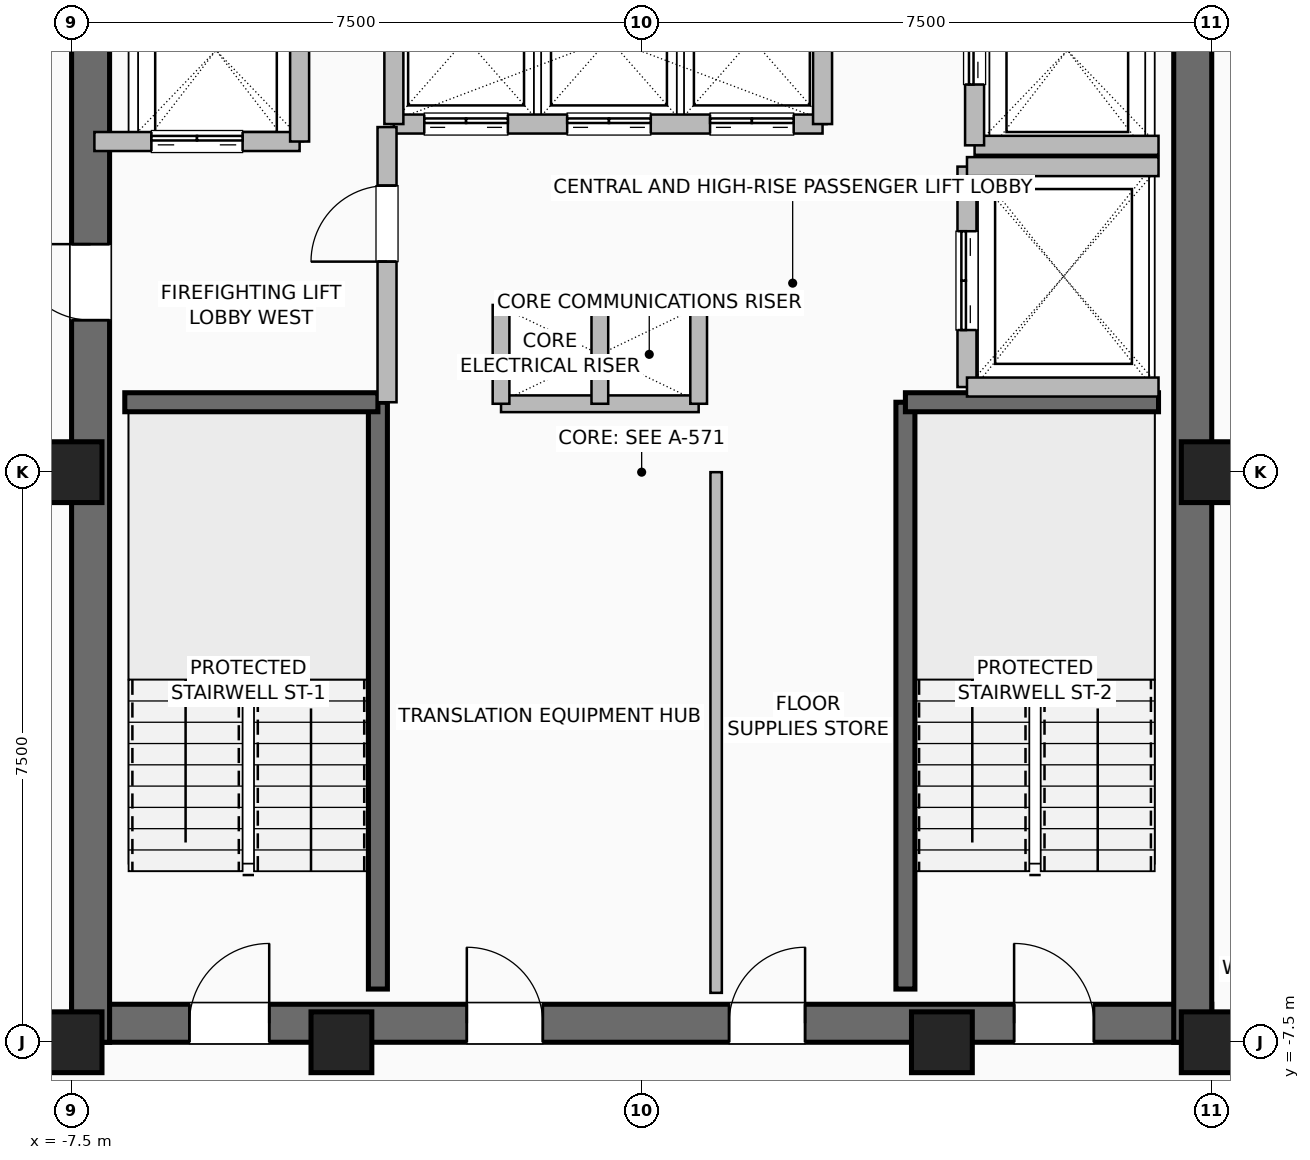
"""IFC4 building model, lengths in metres.
Left out: names, types, materials, properties, quantities, classifications, styles, units other than length and angle.
Written with IfcOpenShell. Run it as: python <this file> out.ifc"""

import sys

from ifc_helpers import new_model, si_unit, direction, frame, frame_2d, origin, origin_2d, place, context, subcontext, project, spatial, rectangle, hollow_rectangle, extrude, element, fill, save


model = new_model("IFC4")
c1 = context("Model", 3, precision=1e-05, world=origin(), true_north=direction((0.0, 1.0)))
c2 = subcontext(c1, "Body", "Model", "MODEL_VIEW")
j1 = project(units=[si_unit("LENGTHUNIT", "METRE"), si_unit("PLANEANGLEUNIT", "RADIAN")], contexts=[c1])
p1 = place(None, origin())
s1 = spatial("IfcSite", under=j1, at=p1, CompositionType="ELEMENT")
p2 = place(p1, origin())
s2 = spatial("IfcBuilding", under=s1, at=p2, CompositionType="ELEMENT")
p3 = place(p2, frame((0.0, 0.0, 282.8)))
s3 = spatial("IfcBuildingStorey", under=s2, at=p3, CompositionType="ELEMENT", Elevation=282.8)
for number, where, z_axis, x_axis in (
    (1, (-7.5, -7.5, 0.0), (0.0, 0.0, 1.0), (1.0, 0.0, 0.0)),
    (2, (-3.95, -7.5, 0.0), (0.0, 0.0, 1.0), (1.0, 0.0, 0.0)),
    (3, (3.95, -7.5, 0.0), (0.0, 0.0, 1.0), (1.0, 0.0, 0.0)),
    (4, (7.5, -7.5, 0.0), (0.0, 0.0, 1.0), (1.0, 0.0, 0.0)),
    (5, (7.5, 0.0, 0.0), (0.0, 0.0, 1.0), (1.0, 0.0, 0.0)),
    (6, (-7.5, 0.0, 0.0), (0.0, 0.0, 1.0), (1.0, 0.0, 0.0)),
):
    element("IfcColumn", number, at=place(p3, frame(where, z_axis=z_axis, x_axis=x_axis)), inside=s3, PredefinedType="COLUMN", context=c2, shape_type="SweptSolid", body=[
        extrude(hollow_rectangle(XDim=0.8, YDim=0.8, WallThickness=0.04, at=origin_2d()), origin(), (0.0, 0.0, 1.0), 3.6),
    ])
p4 = place(p3, frame((-7.5, -7.25, 0.0), z_axis=(0.0, 0.0, 1.0), x_axis=(1.0, 0.0, 0.0)))
e7 = element("IfcWall", 7, at=p4, inside=s3, PredefinedType="SHEAR", context=c2, shape_type="SweptSolid", body=[
    extrude(rectangle(XDim=15.0, YDim=0.5, at=frame_2d((7.5, 0.0))), origin(), (0.0, 0.0, 1.0), 3.36),
])
p5 = place(p4, frame((1.55, 0.0, 0.0)))
e8 = element("IfcOpeningElement", 8, at=p5, cuts=e7, PredefinedType="OPENING", context=c2, shape_type="SweptSolid", body=[
    extrude(rectangle(XDim=1.05, YDim=2.08, at=frame_2d((0.525, 1.04))), frame((0.0, 0.26, 0.0), z_axis=(0.0, -1.0, 0.0), x_axis=(1.0, 0.0, 0.0)), (0.0, 0.0, 1.0), 0.52),
])
p6 = place(p4, frame((12.4, 0.0, 0.0)))
e9 = element("IfcOpeningElement", 9, at=p6, cuts=e7, PredefinedType="OPENING", context=c2, shape_type="SweptSolid", body=[
    extrude(rectangle(XDim=1.05, YDim=2.08, at=frame_2d((0.525, 1.04))), frame((0.0, 0.26, 0.0), z_axis=(0.0, -1.0, 0.0), x_axis=(1.0, 0.0, 0.0)), (0.0, 0.0, 1.0), 0.52),
])
p7 = place(p4, frame((5.2, 0.0, 0.0)))
e10 = element("IfcOpeningElement", 10, at=p7, cuts=e7, PredefinedType="OPENING", context=c2, shape_type="SweptSolid", body=[
    extrude(rectangle(XDim=1.0, YDim=2.08, at=frame_2d((0.5, 1.04))), frame((0.0, 0.26, 0.0), z_axis=(0.0, -1.0, 0.0), x_axis=(1.0, 0.0, 0.0)), (0.0, 0.0, 1.0), 0.52),
])
p8 = place(p4, frame((8.65, 0.0, 0.0)))
e11 = element("IfcOpeningElement", 11, at=p8, cuts=e7, PredefinedType="OPENING", context=c2, shape_type="SweptSolid", body=[
    extrude(rectangle(XDim=1.0, YDim=2.08, at=frame_2d((0.5, 1.04))), frame((0.0, 0.26, 0.0), z_axis=(0.0, -1.0, 0.0), x_axis=(1.0, 0.0, 0.0)), (0.0, 0.0, 1.0), 0.52),
])
p9 = place(p3, frame((-7.25, -7.5, 0.0), z_axis=(0.0, 0.0, 1.0), x_axis=(0.0, 1.0, 0.0)))
e12 = element("IfcWall", 12, at=p9, inside=s3, PredefinedType="SHEAR", context=c2, shape_type="SweptSolid", body=[
    extrude(rectangle(XDim=15.0, YDim=0.5, at=frame_2d((7.5, 0.0))), origin(), (0.0, 0.0, 1.0), 3.36),
])
p10 = place(p9, frame((9.5, 0.0, 0.0)))
e13 = element("IfcOpeningElement", 13, at=p10, cuts=e12, PredefinedType="OPENING", context=c2, shape_type="SweptSolid", body=[
    extrude(rectangle(XDim=1.0, YDim=2.08, at=frame_2d((0.5, 1.04))), frame((0.0, 0.26, 0.0), z_axis=(0.0, -1.0, 0.0), x_axis=(1.0, 0.0, 0.0)), (0.0, 0.0, 1.0), 0.52),
])
p11 = place(p3, frame((7.25, -7.5, 0.0), z_axis=(0.0, 0.0, 1.0), x_axis=(0.0, 1.0, 0.0)))
e14 = element("IfcWall", 14, at=p11, inside=s3, PredefinedType="SHEAR", context=c2, shape_type="SweptSolid", body=[
    extrude(rectangle(XDim=15.0, YDim=0.5, at=frame_2d((7.5, 0.0))), origin(), (0.0, 0.0, 1.0), 3.36),
])
p12 = place(p3, frame((-3.47, -6.8, 0.0), z_axis=(0.0, 0.0, 1.0), x_axis=(0.0, 1.0, 0.0)))
e15 = element("IfcWall", 15, at=p12, inside=s3, PredefinedType="SHEAR", context=c2, shape_type="SweptSolid", body=[
    extrude(rectangle(XDim=7.72, YDim=0.25, at=frame_2d((3.86, 0.0))), origin(), (0.0, 0.0, 1.0), 3.36),
])
p13 = place(p3, frame((-6.8, 0.92, 0.0), z_axis=(0.0, 0.0, 1.0), x_axis=(1.0, 0.0, 0.0)))
e16 = element("IfcWall", 16, at=p13, inside=s3, PredefinedType="SHEAR", context=c2, shape_type="SweptSolid", body=[
    extrude(rectangle(XDim=3.33, YDim=0.25, at=frame_2d((1.665, 0.0))), origin(), (0.0, 0.0, 1.0), 3.36),
])
p14 = place(p3, frame((3.47, -6.8, 0.0), z_axis=(0.0, 0.0, 1.0), x_axis=(0.0, 1.0, 0.0)))
e17 = element("IfcWall", 17, at=p14, inside=s3, PredefinedType="SHEAR", context=c2, shape_type="SweptSolid", body=[
    extrude(rectangle(XDim=7.72, YDim=0.25, at=frame_2d((3.86, 0.0))), origin(), (0.0, 0.0, 1.0), 3.36),
])
p15 = place(p3, frame((3.47, 0.92, 0.0), z_axis=(0.0, 0.0, 1.0), x_axis=(1.0, 0.0, 0.0)))
e18 = element("IfcWall", 18, at=p15, inside=s3, PredefinedType="SHEAR", context=c2, shape_type="SweptSolid", body=[
    extrude(rectangle(XDim=3.33, YDim=0.25, at=frame_2d((1.665, 0.0))), origin(), (0.0, 0.0, 1.0), 3.36),
])
for number, where, z_axis, x_axis in (
    (19, (-1.85, 2.2, 0.0), (0.0, 0.0, 1.0), (1.0, 0.0, 0.0)),
    (20, (-1.85, 0.9, 0.0), (0.0, 0.0, 1.0), (1.0, 0.0, 0.0)),
):
    element("IfcWall", number, at=place(p3, frame(where, z_axis=z_axis, x_axis=x_axis)), inside=s3, PredefinedType="PARTITIONING", context=c2, shape_type="SweptSolid", body=[
        extrude(rectangle(XDim=2.6, YDim=0.22, at=frame_2d((1.3, 0.0))), origin(), (0.0, 0.0, 1.0), 3.36),
    ])
for number, where, z_axis, x_axis in (
    (21, (-0.55, 0.9, 0.0), (0.0, 0.0, 1.0), (0.0, 1.0, 0.0)),
    (22, (0.75, 0.9, 0.0), (0.0, 0.0, 1.0), (0.0, 1.0, 0.0)),
    (23, (-1.85, 0.9, 0.0), (0.0, 0.0, 1.0), (0.0, 1.0, 0.0)),
):
    element("IfcWall", number, at=place(p3, frame(where, z_axis=z_axis, x_axis=x_axis)), inside=s3, PredefinedType="PARTITIONING", context=c2, shape_type="SweptSolid", body=[
        extrude(rectangle(XDim=1.3, YDim=0.22, at=frame_2d((0.65, 0.0))), origin(), (0.0, 0.0, 1.0), 3.36),
    ])
p16 = place(p3, frame((-3.26, 4.58, 0.0), z_axis=(0.0, 0.0, 1.0), x_axis=(1.0, 0.0, 0.0)))
e24 = element("IfcWall", 24, at=p16, inside=s3, PredefinedType="SHEAR", context=c2, shape_type="SweptSolid", body=[
    extrude(rectangle(XDim=5.64, YDim=0.25, at=frame_2d((2.82, 0.0))), origin(), (0.0, 0.0, 1.0), 3.36),
])
p17 = place(p16, frame((0.4, 0.0, 0.0)))
e25 = element("IfcOpeningElement", 25, at=p17, cuts=e24, PredefinedType="OPENING", context=c2, shape_type="SweptSolid", body=[
    extrude(rectangle(XDim=1.1, YDim=2.2, at=frame_2d((0.55, 1.1))), frame((0.0, 0.135, 0.0), z_axis=(0.0, -1.0, 0.0), x_axis=(1.0, 0.0, 0.0)), (0.0, 0.0, 1.0), 0.27),
])
p18 = place(p16, frame((2.28, 0.0, 0.0)))
e26 = element("IfcOpeningElement", 26, at=p18, cuts=e24, PredefinedType="OPENING", context=c2, shape_type="SweptSolid", body=[
    extrude(rectangle(XDim=1.1, YDim=2.2, at=frame_2d((0.55, 1.1))), frame((0.0, 0.135, 0.0), z_axis=(0.0, -1.0, 0.0), x_axis=(1.0, 0.0, 0.0)), (0.0, 0.0, 1.0), 0.27),
])
p19 = place(p16, frame((4.16, 0.0, 0.0)))
e27 = element("IfcOpeningElement", 27, at=p19, cuts=e24, PredefinedType="OPENING", context=c2, shape_type="SweptSolid", body=[
    extrude(rectangle(XDim=1.1, YDim=2.2, at=frame_2d((0.55, 1.1))), frame((0.0, 0.135, 0.0), z_axis=(0.0, -1.0, 0.0), x_axis=(1.0, 0.0, 0.0)), (0.0, 0.0, 1.0), 0.27),
])
for number, where, z_axis, x_axis in (
    (28, (-3.26, 4.58, 0.0), (0.0, 0.0, 1.0), (0.0, 1.0, 0.0)),
    (29, (2.38, 4.58, 0.0), (0.0, 0.0, 1.0), (0.0, 1.0, 0.0)),
):
    element("IfcWall", number, at=place(p3, frame(where, z_axis=z_axis, x_axis=x_axis)), inside=s3, PredefinedType="SHEAR", context=c2, shape_type="SweptSolid", body=[
        extrude(rectangle(XDim=2.22, YDim=0.25, at=frame_2d((1.11, 0.0))), origin(), (0.0, 0.0, 1.0), 3.36),
    ])
p20 = place(p3, frame((-7.2, 4.35, 0.0), z_axis=(0.0, 0.0, 1.0), x_axis=(1.0, 0.0, 0.0)))
e30 = element("IfcWall", 30, at=p20, inside=s3, PredefinedType="SHEAR", context=c2, shape_type="SweptSolid", body=[
    extrude(rectangle(XDim=2.7, YDim=0.25, at=frame_2d((1.35, 0.0))), origin(), (0.0, 0.0, 1.0), 3.36),
])
p21 = place(p20, frame((0.75, 0.0, 0.0)))
e31 = element("IfcOpeningElement", 31, at=p21, cuts=e30, PredefinedType="OPENING", context=c2, shape_type="SweptSolid", body=[
    extrude(rectangle(XDim=1.2, YDim=2.2, at=frame_2d((0.6, 1.1))), frame((0.0, 0.135, 0.0), z_axis=(0.0, -1.0, 0.0), x_axis=(1.0, 0.0, 0.0)), (0.0, 0.0, 1.0), 0.27),
])
p22 = place(p3, frame((-4.5, 4.35, 0.0), z_axis=(0.0, 0.0, 1.0), x_axis=(0.0, 1.0, 0.0)))
e32 = element("IfcWall", 32, at=p22, inside=s3, PredefinedType="SHEAR", context=c2, shape_type="SweptSolid", body=[
    extrude(rectangle(XDim=2.85, YDim=0.25, at=frame_2d((1.425, 0.0))), origin(), (0.0, 0.0, 1.0), 3.36),
])
p23 = place(p3, frame((4.38, 4.3, 0.0), z_axis=(0.0, 0.0, 1.0), x_axis=(1.0, 0.0, 0.0)))
e33 = element("IfcWall", 33, at=p23, inside=s3, PredefinedType="SHEAR", context=c2, shape_type="SweptSolid", body=[
    extrude(rectangle(XDim=2.42, YDim=0.25, at=frame_2d((1.21, 0.0))), origin(), (0.0, 0.0, 1.0), 3.36),
])
p24 = place(p3, frame((4.38, 4.3, 0.0), z_axis=(0.0, 0.0, 1.0), x_axis=(0.0, 1.0, 0.0)))
e34 = element("IfcWall", 34, at=p24, inside=s3, PredefinedType="SHEAR", context=c2, shape_type="SweptSolid", body=[
    extrude(rectangle(XDim=2.5, YDim=0.25, at=frame_2d((1.25, 0.0))), origin(), (0.0, 0.0, 1.0), 3.36),
])
p25 = place(p24, frame((0.8, 0.0, 0.0)))
e35 = element("IfcOpeningElement", 35, at=p25, cuts=e34, PredefinedType="OPENING", context=c2, shape_type="SweptSolid", body=[
    extrude(rectangle(XDim=1.2, YDim=2.2, at=frame_2d((0.6, 1.1))), frame((0.0, 0.135, 0.0), z_axis=(0.0, -1.0, 0.0), x_axis=(1.0, 0.0, 0.0)), (0.0, 0.0, 1.0), 0.27),
])
p26 = place(p3, frame((4.28, 1.12, 0.0), z_axis=(0.0, 0.0, 1.0), x_axis=(0.0, 1.0, 0.0)))
e36 = element("IfcWall", 36, at=p26, inside=s3, PredefinedType="SHEAR", context=c2, shape_type="SweptSolid", body=[
    extrude(rectangle(XDim=2.9, YDim=0.25, at=frame_2d((1.45, 0.0))), origin(), (0.0, 0.0, 1.0), 3.36),
])
p27 = place(p26, frame((0.75, 0.0, 0.0)))
e37 = element("IfcOpeningElement", 37, at=p27, cuts=e36, PredefinedType="OPENING", context=c2, shape_type="SweptSolid", body=[
    extrude(rectangle(XDim=1.3, YDim=2.3, at=frame_2d((0.65, 1.15))), frame((0.0, 0.135, 0.0), z_axis=(0.0, -1.0, 0.0), x_axis=(1.0, 0.0, 0.0)), (0.0, 0.0, 1.0), 0.27),
])
for number, where, z_axis, x_axis in (
    (38, (4.28, 1.12, 0.0), (0.0, 0.0, 1.0), (1.0, 0.0, 0.0)),
    (39, (4.28, 4.02, 0.0), (0.0, 0.0, 1.0), (1.0, 0.0, 0.0)),
):
    element("IfcWall", number, at=place(p3, frame(where, z_axis=z_axis, x_axis=x_axis)), inside=s3, PredefinedType="SHEAR", context=c2, shape_type="SweptSolid", body=[
        extrude(rectangle(XDim=2.52, YDim=0.25, at=frame_2d((1.26, 0.0))), origin(), (0.0, 0.0, 1.0), 3.36),
    ])
p28 = place(p3, frame((-3.35, 0.92, 0.0), z_axis=(0.0, 0.0, 1.0), x_axis=(0.0, 1.0, 0.0)))
e40 = element("IfcWall", 40, at=p28, inside=s3, PredefinedType="SHEAR", context=c2, shape_type="SweptSolid", body=[
    extrude(rectangle(XDim=3.62, YDim=0.25, at=frame_2d((1.81, 0.0))), origin(), (0.0, 0.0, 1.0), 3.36),
])
p29 = place(p28, frame((1.85, 0.0, 0.0)))
e41 = element("IfcOpeningElement", 41, at=p29, cuts=e40, PredefinedType="OPENING", context=c2, shape_type="SweptSolid", body=[
    extrude(rectangle(XDim=1.0, YDim=2.08, at=frame_2d((0.5, 1.04))), frame((0.0, 0.135, 0.0), z_axis=(0.0, -1.0, 0.0), x_axis=(1.0, 0.0, 0.0)), (0.0, 0.0, 1.0), 0.27),
])
p30 = place(p3, frame((0.98, -6.85, 0.0), z_axis=(0.0, 0.0, 1.0), x_axis=(0.0, 1.0, 0.0)))
e42 = element("IfcWall", 42, at=p30, inside=s3, PredefinedType="PARTITIONING", context=c2, shape_type="SweptSolid", body=[
    extrude(rectangle(XDim=6.85, YDim=0.15, at=frame_2d((3.425, 0.0))), origin(), (0.0, 0.0, 1.0), 3.36),
])
p31 = place(p3, frame((7.45, -7.48, 0.0), z_axis=(0.0, 0.0, 1.0), x_axis=(1.0, 0.0, 0.0)))
e43 = element("IfcWall", 43, at=p31, inside=s3, PredefinedType="PARTITIONING", context=c2, shape_type="SweptSolid", body=[
    extrude(rectangle(XDim=0.95, YDim=0.15, at=frame_2d((0.475, 0.0))), origin(), (0.0, 0.0, 1.0), 3.36),
])
p32 = place(p5, origin())
e44 = element("IfcDoor", 44, at=p32, inside=s3, OperationType="SINGLE_SWING_RIGHT", PredefinedType="DOOR", context=c2, shape_type="SweptSolid", body=[
    extrude(rectangle(XDim=1.05, YDim=2.08, at=frame_2d((0.525, 1.04))), frame((0.0, 0.025, 0.0), z_axis=(0.0, -1.0, 0.0), x_axis=(1.0, 0.0, 0.0)), (0.0, 0.0, 1.0), 0.05),
])
fill(e8, e44)
p33 = place(p6, origin())
e45 = element("IfcDoor", 45, at=p33, inside=s3, OperationType="SINGLE_SWING_LEFT", PredefinedType="DOOR", context=c2, shape_type="SweptSolid", body=[
    extrude(rectangle(XDim=1.05, YDim=2.08, at=frame_2d((0.525, 1.04))), frame((0.0, 0.025, 0.0), z_axis=(0.0, -1.0, 0.0), x_axis=(1.0, 0.0, 0.0)), (0.0, 0.0, 1.0), 0.05),
])
fill(e9, e45)
p34 = place(p10, origin())
e46 = element("IfcDoor", 46, at=p34, inside=s3, OperationType="SINGLE_SWING_RIGHT", PredefinedType="DOOR", context=c2, shape_type="SweptSolid", body=[
    extrude(rectangle(XDim=1.0, YDim=2.08, at=frame_2d((0.5, 1.04))), frame((0.0, 0.025, 0.0), z_axis=(0.0, -1.0, 0.0), x_axis=(1.0, 0.0, 0.0)), (0.0, 0.0, 1.0), 0.05),
])
fill(e13, e46)
p35 = place(p7, origin())
e47 = element("IfcDoor", 47, at=p35, inside=s3, OperationType="SINGLE_SWING_LEFT", PredefinedType="DOOR", context=c2, shape_type="SweptSolid", body=[
    extrude(rectangle(XDim=1.0, YDim=2.08, at=frame_2d((0.5, 1.04))), frame((0.0, 0.025, 0.0), z_axis=(0.0, -1.0, 0.0), x_axis=(1.0, 0.0, 0.0)), (0.0, 0.0, 1.0), 0.05),
])
fill(e10, e47)
p36 = place(p8, origin())
e48 = element("IfcDoor", 48, at=p36, inside=s3, OperationType="SINGLE_SWING_RIGHT", PredefinedType="DOOR", context=c2, shape_type="SweptSolid", body=[
    extrude(rectangle(XDim=1.0, YDim=2.08, at=frame_2d((0.5, 1.04))), frame((0.0, 0.025, 0.0), z_axis=(0.0, -1.0, 0.0), x_axis=(1.0, 0.0, 0.0)), (0.0, 0.0, 1.0), 0.05),
])
fill(e11, e48)
p37 = place(p17, origin())
e49 = element("IfcDoor", 49, at=p37, inside=s3, OperationType="DOUBLE_DOOR_SLIDING", PredefinedType="DOOR", context=c2, shape_type="SweptSolid", body=[
    extrude(rectangle(XDim=1.1, YDim=2.2, at=frame_2d((0.55, 1.1))), frame((0.0, 0.025, 0.0), z_axis=(0.0, -1.0, 0.0), x_axis=(1.0, 0.0, 0.0)), (0.0, 0.0, 1.0), 0.05),
])
fill(e25, e49)
p38 = place(p18, origin())
e50 = element("IfcDoor", 50, at=p38, inside=s3, OperationType="DOUBLE_DOOR_SLIDING", PredefinedType="DOOR", context=c2, shape_type="SweptSolid", body=[
    extrude(rectangle(XDim=1.1, YDim=2.2, at=frame_2d((0.55, 1.1))), frame((0.0, 0.025, 0.0), z_axis=(0.0, -1.0, 0.0), x_axis=(1.0, 0.0, 0.0)), (0.0, 0.0, 1.0), 0.05),
])
fill(e26, e50)
p39 = place(p19, origin())
e51 = element("IfcDoor", 51, at=p39, inside=s3, OperationType="DOUBLE_DOOR_SLIDING", PredefinedType="DOOR", context=c2, shape_type="SweptSolid", body=[
    extrude(rectangle(XDim=1.1, YDim=2.2, at=frame_2d((0.55, 1.1))), frame((0.0, 0.025, 0.0), z_axis=(0.0, -1.0, 0.0), x_axis=(1.0, 0.0, 0.0)), (0.0, 0.0, 1.0), 0.05),
])
fill(e27, e51)
p40 = place(p21, origin())
e52 = element("IfcDoor", 52, at=p40, inside=s3, OperationType="DOUBLE_DOOR_SLIDING", PredefinedType="DOOR", context=c2, shape_type="SweptSolid", body=[
    extrude(rectangle(XDim=1.2, YDim=2.2, at=frame_2d((0.6, 1.1))), frame((0.0, 0.025, 0.0), z_axis=(0.0, -1.0, 0.0), x_axis=(1.0, 0.0, 0.0)), (0.0, 0.0, 1.0), 0.05),
])
fill(e31, e52)
p41 = place(p25, origin())
e53 = element("IfcDoor", 53, at=p41, inside=s3, OperationType="DOUBLE_DOOR_SLIDING", PredefinedType="DOOR", context=c2, shape_type="SweptSolid", body=[
    extrude(rectangle(XDim=1.2, YDim=2.2, at=frame_2d((0.6, 1.1))), frame((0.0, 0.025, 0.0), z_axis=(0.0, -1.0, 0.0), x_axis=(1.0, 0.0, 0.0)), (0.0, 0.0, 1.0), 0.05),
])
fill(e35, e53)
p42 = place(p27, origin())
e54 = element("IfcDoor", 54, at=p42, inside=s3, OperationType="DOUBLE_DOOR_SLIDING", PredefinedType="DOOR", context=c2, shape_type="SweptSolid", body=[
    extrude(rectangle(XDim=1.3, YDim=2.3, at=frame_2d((0.65, 1.15))), frame((0.0, 0.025, 0.0), z_axis=(0.0, -1.0, 0.0), x_axis=(1.0, 0.0, 0.0)), (0.0, 0.0, 1.0), 0.05),
])
fill(e37, e54)
p43 = place(p29, origin())
e55 = element("IfcDoor", 55, at=p43, inside=s3, OperationType="SINGLE_SWING_LEFT", PredefinedType="DOOR", context=c2, shape_type="SweptSolid", body=[
    extrude(rectangle(XDim=1.0, YDim=2.08, at=frame_2d((0.5, 1.04))), frame((0.0, 0.025, 0.0), z_axis=(0.0, -1.0, 0.0), x_axis=(1.0, 0.0, 0.0)), (0.0, 0.0, 1.0), 0.05),
])
fill(e41, e55)
save(model, sys.argv[1])
